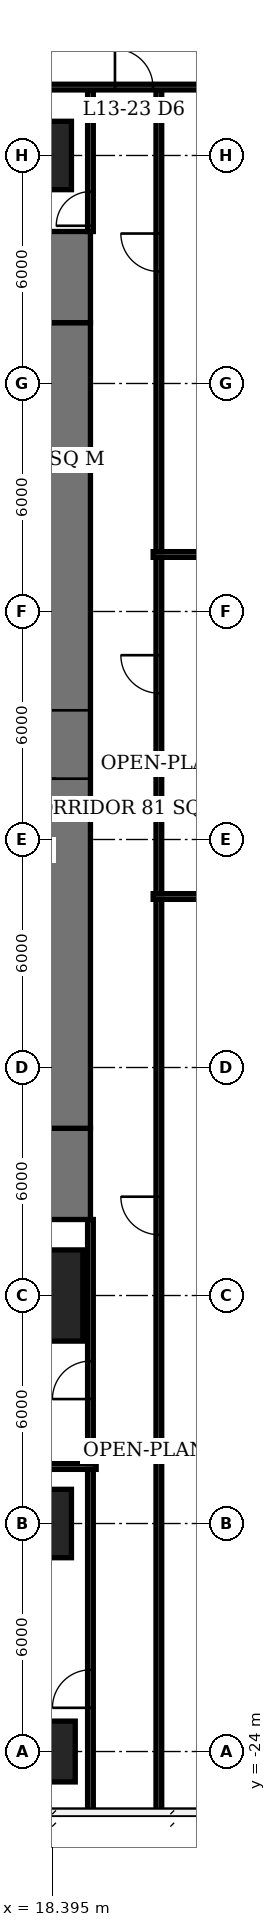
"""IFC4 building model, lengths in metres.
Left out: names, types, materials, properties, quantities, classifications, styles, units other than length and angle.
Written with IfcOpenShell. Run it as: python <this file> out.ifc"""

import sys

from ifc_helpers import new_model, si_unit, direction, frame, frame_2d, origin, origin_2d, place, context, subcontext, project, spatial, rectangle, extrude, element, fill, save


model = new_model("IFC4")
c1 = context("Model", 3, precision=1e-05, world=origin(), true_north=direction((0.0, 1.0)))
c2 = subcontext(c1, "Body", "Model", "MODEL_VIEW")
j1 = project(units=[si_unit("LENGTHUNIT", "METRE"), si_unit("PLANEANGLEUNIT", "RADIAN")], contexts=[c1])
p1 = place(None, origin())
s1 = spatial("IfcSite", under=j1, at=p1, CompositionType="ELEMENT")
p2 = place(p1, origin())
s2 = spatial("IfcBuilding", under=s1, at=p2, CompositionType="ELEMENT")
p3 = place(p2, frame((0.0, 0.0, 57.2)))
s3 = spatial("IfcBuildingStorey", under=s2, at=p3, CompositionType="ELEMENT", Elevation=57.2)
p4 = place(p3, frame((18.0, -24.0, 0.0), z_axis=(0.0, 0.0, 1.0), x_axis=(1.0, 0.0, 0.0)))
e1 = element("IfcColumn", 1, at=p4, inside=s3, PredefinedType="COLUMN", context=c2, shape_type="SweptSolid", body=[
    extrude(rectangle(XDim=2.0, YDim=1.6, at=origin_2d()), origin(), (0.0, 0.0, 1.0), 3.9),
])
p5 = place(p3, frame((18.0, -18.0, 0.0), z_axis=(0.0, 0.0, 1.0), x_axis=(1.0, 0.0, 0.0)))
e2 = element("IfcColumn", 2, at=p5, inside=s3, PredefinedType="COLUMN", context=c2, shape_type="SweptSolid", body=[
    extrude(rectangle(XDim=1.8, YDim=1.8, at=origin_2d()), origin(), (0.0, 0.0, 1.0), 3.9),
])
p6 = place(p3, frame((18.0, -12.0, 0.0), z_axis=(0.0, 0.0, 1.0), x_axis=(1.0, 0.0, 0.0)))
e3 = element("IfcColumn", 3, at=p6, inside=s3, PredefinedType="COLUMN", context=c2, shape_type="SweptSolid", body=[
    extrude(rectangle(XDim=2.4, YDim=2.4, at=origin_2d()), origin(), (0.0, 0.0, 1.0), 3.9),
])
p7 = place(p3, frame((18.0, 18.0, 0.0), z_axis=(0.0, 0.0, 1.0), x_axis=(1.0, 0.0, 0.0)))
e4 = element("IfcColumn", 4, at=p7, inside=s3, PredefinedType="COLUMN", context=c2, shape_type="SweptSolid", body=[
    extrude(rectangle(XDim=1.8, YDim=1.8, at=origin_2d()), origin(), (0.0, 0.0, 1.0), 3.9),
])
p8 = place(p3, frame((18.5, -7.6, 0.0), z_axis=(0.0, 0.0, 1.0), x_axis=(0.0, 1.0, 0.0)))
e5 = element("IfcWall", 5, at=p8, inside=s3, PredefinedType="SHEAR", context=c2, shape_type="SweptSolid", body=[
    extrude(rectangle(XDim=21.2, YDim=1.8, at=frame_2d((10.6, 0.0))), origin(), (0.0, 0.0, 1.0), 3.9),
])
p9 = place(p8, frame((9.2, 0.0, 0.0)))
e6 = element("IfcOpeningElement", 6, at=p9, cuts=e5, PredefinedType="OPENING", context=c2, shape_type="SweptSolid", body=[
    extrude(rectangle(XDim=1.8, YDim=2.4, at=frame_2d((0.9, 1.2))), frame((0.0, 0.91, 0.0), z_axis=(0.0, -1.0, 0.0), x_axis=(1.0, 0.0, 0.0)), (0.0, 0.0, 1.0), 1.82),
])
for number, where, z_axis, x_axis in (
    (7, (18.5, -10.0, 0.0), (0.0, 0.0, 1.0), (0.0, 1.0, 0.0)),
    (8, (18.5, 13.6, 0.0), (0.0, 0.0, 1.0), (0.0, 1.0, 0.0)),
):
    element("IfcWall", number, at=place(p3, frame(where, z_axis=z_axis, x_axis=x_axis)), inside=s3, PredefinedType="SHEAR", context=c2, shape_type="SweptSolid", body=[
        extrude(rectangle(XDim=2.4, YDim=1.8, at=frame_2d((1.2, 0.0))), origin(), (0.0, 0.0, 1.0), 3.9),
    ])
p10 = place(p3, frame((18.075, 19.8, 0.0), z_axis=(0.0, 0.0, 1.0), x_axis=(1.0, 0.0, 0.0)))
e9 = element("IfcWall", 9, at=p10, inside=s3, PredefinedType="PARTITIONING", context=c2, shape_type="SweptSolid", body=[
    extrude(rectangle(XDim=5.015, YDim=0.15, at=frame_2d((2.508, 0.0))), origin(), (0.0, 0.0, 1.0), 3.65),
])
p11 = place(p10, frame((1.97, 0.0, 0.0)))
e10 = element("IfcOpeningElement", 10, at=p11, cuts=e9, PredefinedType="OPENING", context=c2, shape_type="SweptSolid", body=[
    extrude(rectangle(XDim=1.0, YDim=2.1, at=frame_2d((0.5, 1.05))), frame((0.0, 0.085, 0.0), z_axis=(0.0, -1.0, 0.0), x_axis=(1.0, 0.0, 0.0)), (0.0, 0.0, 1.0), 0.17),
])
p12 = place(p3, frame((4.575, -16.5, 0.0), z_axis=(0.0, 0.0, 1.0), x_axis=(1.0, 0.0, 0.0)))
e11 = element("IfcWall", 11, at=p12, inside=s3, PredefinedType="PARTITIONING", context=c2, shape_type="SweptSolid", body=[
    extrude(rectangle(XDim=14.975, YDim=0.15, at=frame_2d((7.488, 0.0))), origin(), (0.0, 0.0, 1.0), 3.65),
])
p13 = place(p3, frame((19.4, -25.6, 0.0), z_axis=(0.0, 0.0, 1.0), x_axis=(0.0, 1.0, 0.0)))
e12 = element("IfcWall", 12, at=p13, inside=s3, PredefinedType="PARTITIONING", context=c2, shape_type="SweptSolid", body=[
    extrude(rectangle(XDim=9.025, YDim=0.15, at=frame_2d((4.513, 0.0))), origin(), (0.0, 0.0, 1.0), 3.65),
])
p14 = place(p13, frame((2.75, 0.0, 0.0)))
e13 = element("IfcOpeningElement", 13, at=p14, cuts=e12, PredefinedType="OPENING", context=c2, shape_type="SweptSolid", body=[
    extrude(rectangle(XDim=1.0, YDim=2.1, at=frame_2d((0.5, 1.05))), frame((0.0, 0.085, 0.0), z_axis=(0.0, -1.0, 0.0), x_axis=(1.0, 0.0, 0.0)), (0.0, 0.0, 1.0), 0.17),
])
p15 = place(p3, frame((19.4, -16.425, 0.0), z_axis=(0.0, 0.0, 1.0), x_axis=(0.0, 1.0, 0.0)))
e14 = element("IfcWall", 14, at=p15, inside=s3, PredefinedType="PARTITIONING", context=c2, shape_type="SweptSolid", body=[
    extrude(rectangle(XDim=6.425, YDim=0.15, at=frame_2d((3.212, 0.0))), origin(), (0.0, 0.0, 1.0), 3.65),
])
p16 = place(p15, frame((1.7, 0.0, 0.0)))
e15 = element("IfcOpeningElement", 15, at=p16, cuts=e14, PredefinedType="OPENING", context=c2, shape_type="SweptSolid", body=[
    extrude(rectangle(XDim=1.0, YDim=2.1, at=frame_2d((0.5, 1.05))), frame((0.0, 0.085, 0.0), z_axis=(0.0, -1.0, 0.0), x_axis=(1.0, 0.0, 0.0)), (0.0, 0.0, 1.0), 0.17),
])
p17 = place(p3, frame((19.4, 16.0, 0.0), z_axis=(0.0, 0.0, 1.0), x_axis=(0.0, 1.0, 0.0)))
e16 = element("IfcWall", 16, at=p17, inside=s3, PredefinedType="PARTITIONING", context=c2, shape_type="SweptSolid", body=[
    extrude(rectangle(XDim=3.725, YDim=0.15, at=frame_2d((1.863, 0.0))), origin(), (0.0, 0.0, 1.0), 3.65),
])
p18 = place(p17, frame((0.15, 0.0, 0.0)))
e17 = element("IfcOpeningElement", 17, at=p18, cuts=e16, PredefinedType="OPENING", context=c2, shape_type="SweptSolid", body=[
    extrude(rectangle(XDim=0.9, YDim=2.1, at=frame_2d((0.45, 1.05))), frame((0.0, 0.085, 0.0), z_axis=(0.0, -1.0, 0.0), x_axis=(1.0, 0.0, 0.0)), (0.0, 0.0, 1.0), 0.17),
])
p19 = place(p3, frame((21.2, -25.6, 0.0), z_axis=(0.0, 0.0, 1.0), x_axis=(0.0, 1.0, 0.0)))
e18 = element("IfcWall", 18, at=p19, inside=s3, PredefinedType="PARTITIONING", context=c2, shape_type="SweptSolid", body=[
    extrude(rectangle(XDim=24.025, YDim=0.15, at=frame_2d((12.013, 0.0))), origin(), (0.0, 0.0, 1.0), 3.65),
])
p20 = place(p19, frame((15.2, 0.0, 0.0)))
e19 = element("IfcOpeningElement", 19, at=p20, cuts=e18, PredefinedType="OPENING", context=c2, shape_type="SweptSolid", body=[
    extrude(rectangle(XDim=1.0, YDim=2.1, at=frame_2d((0.5, 1.05))), frame((0.0, 0.085, 0.0), z_axis=(0.0, -1.0, 0.0), x_axis=(1.0, 0.0, 0.0)), (0.0, 0.0, 1.0), 0.17),
])
p21 = place(p3, frame((21.2, -1.425, 0.0), z_axis=(0.0, 0.0, 1.0), x_axis=(0.0, 1.0, 0.0)))
e20 = element("IfcWall", 20, at=p21, inside=s3, PredefinedType="PARTITIONING", context=c2, shape_type="SweptSolid", body=[
    extrude(rectangle(XDim=8.85, YDim=0.15, at=frame_2d((4.425, 0.0))), origin(), (0.0, 0.0, 1.0), 3.65),
])
p22 = place(p21, frame((5.275, 0.0, 0.0)))
e21 = element("IfcOpeningElement", 21, at=p22, cuts=e20, PredefinedType="OPENING", context=c2, shape_type="SweptSolid", body=[
    extrude(rectangle(XDim=1.0, YDim=2.1, at=frame_2d((0.5, 1.05))), frame((0.0, 0.085, 0.0), z_axis=(0.0, -1.0, 0.0), x_axis=(1.0, 0.0, 0.0)), (0.0, 0.0, 1.0), 0.17),
])
p23 = place(p3, frame((21.05, -1.5, 0.0), z_axis=(0.0, 0.0, 1.0), x_axis=(1.0, 0.0, 0.0)))
e22 = element("IfcWall", 22, at=p23, inside=s3, PredefinedType="PARTITIONING", context=c2, shape_type="SweptSolid", body=[
    extrude(rectangle(XDim=2.875, YDim=0.15, at=frame_2d((1.438, 0.0))), origin(), (0.0, 0.0, 1.0), 3.65),
])
p24 = place(p3, frame((21.2, 7.575, 0.0), z_axis=(0.0, 0.0, 1.0), x_axis=(0.0, 1.0, 0.0)))
e23 = element("IfcWall", 23, at=p24, inside=s3, PredefinedType="PARTITIONING", context=c2, shape_type="SweptSolid", body=[
    extrude(rectangle(XDim=12.15, YDim=0.15, at=frame_2d((6.075, 0.0))), origin(), (0.0, 0.0, 1.0), 3.65),
])
p25 = place(p24, frame((7.371, 0.0, 0.0)))
e24 = element("IfcOpeningElement", 24, at=p25, cuts=e23, PredefinedType="OPENING", context=c2, shape_type="SweptSolid", body=[
    extrude(rectangle(XDim=1.0, YDim=2.1, at=frame_2d((0.5, 1.05))), frame((0.0, 0.085, 0.0), z_axis=(0.0, -1.0, 0.0), x_axis=(1.0, 0.0, 0.0)), (0.0, 0.0, 1.0), 0.17),
])
p26 = place(p3, frame((21.05, 7.5, 0.0), z_axis=(0.0, 0.0, 1.0), x_axis=(1.0, 0.0, 0.0)))
e25 = element("IfcWall", 25, at=p26, inside=s3, PredefinedType="PARTITIONING", context=c2, shape_type="SweptSolid", body=[
    extrude(rectangle(XDim=6.54, YDim=0.15, at=frame_2d((3.27, 0.0))), origin(), (0.0, 0.0, 1.0), 3.65),
])
p27 = place(p9, origin())
e26 = element("IfcDoor", 26, at=p27, inside=s3, OperationType="DOUBLE_DOOR_SINGLE_SWING", PredefinedType="DOOR", context=c2, shape_type="SweptSolid", body=[
    extrude(rectangle(XDim=1.8, YDim=2.4, at=frame_2d((0.9, 1.2))), frame((0.0, 0.025, 0.0), z_axis=(0.0, -1.0, 0.0), x_axis=(1.0, 0.0, 0.0)), (0.0, 0.0, 1.0), 0.05),
])
fill(e6, e26)
p28 = place(p11, origin())
e27 = element("IfcDoor", 27, at=p28, inside=s3, OperationType="SINGLE_SWING_LEFT", PredefinedType="DOOR", context=c2, shape_type="SweptSolid", body=[
    extrude(rectangle(XDim=1.0, YDim=2.1, at=frame_2d((0.5, 1.05))), frame((0.0, 0.025, 0.0), z_axis=(0.0, -1.0, 0.0), x_axis=(1.0, 0.0, 0.0)), (0.0, 0.0, 1.0), 0.05),
])
fill(e10, e27)
p29 = place(p14, origin())
e28 = element("IfcDoor", 28, at=p29, inside=s3, OperationType="SINGLE_SWING_LEFT", PredefinedType="DOOR", context=c2, shape_type="SweptSolid", body=[
    extrude(rectangle(XDim=1.0, YDim=2.1, at=frame_2d((0.5, 1.05))), frame((0.0, 0.025, 0.0), z_axis=(0.0, -1.0, 0.0), x_axis=(1.0, 0.0, 0.0)), (0.0, 0.0, 1.0), 0.05),
])
fill(e13, e28)
p30 = place(p20, origin())
e29 = element("IfcDoor", 29, at=p30, inside=s3, OperationType="SINGLE_SWING_RIGHT", PredefinedType="DOOR", context=c2, shape_type="SweptSolid", body=[
    extrude(rectangle(XDim=1.0, YDim=2.1, at=frame_2d((0.5, 1.05))), frame((0.0, 0.025, 0.0), z_axis=(0.0, -1.0, 0.0), x_axis=(1.0, 0.0, 0.0)), (0.0, 0.0, 1.0), 0.05),
])
fill(e19, e29)
p31 = place(p16, origin())
e30 = element("IfcDoor", 30, at=p31, inside=s3, OperationType="SINGLE_SWING_LEFT", PredefinedType="DOOR", context=c2, shape_type="SweptSolid", body=[
    extrude(rectangle(XDim=1.0, YDim=2.1, at=frame_2d((0.5, 1.05))), frame((0.0, 0.025, 0.0), z_axis=(0.0, -1.0, 0.0), x_axis=(1.0, 0.0, 0.0)), (0.0, 0.0, 1.0), 0.05),
])
fill(e15, e30)
p32 = place(p22, origin())
e31 = element("IfcDoor", 31, at=p32, inside=s3, OperationType="SINGLE_SWING_RIGHT", PredefinedType="DOOR", context=c2, shape_type="SweptSolid", body=[
    extrude(rectangle(XDim=1.0, YDim=2.1, at=frame_2d((0.5, 1.05))), frame((0.0, 0.025, 0.0), z_axis=(0.0, -1.0, 0.0), x_axis=(1.0, 0.0, 0.0)), (0.0, 0.0, 1.0), 0.05),
])
fill(e21, e31)
p33 = place(p25, origin())
e32 = element("IfcDoor", 32, at=p33, inside=s3, OperationType="SINGLE_SWING_RIGHT", PredefinedType="DOOR", context=c2, shape_type="SweptSolid", body=[
    extrude(rectangle(XDim=1.0, YDim=2.1, at=frame_2d((0.5, 1.05))), frame((0.0, 0.025, 0.0), z_axis=(0.0, -1.0, 0.0), x_axis=(1.0, 0.0, 0.0)), (0.0, 0.0, 1.0), 0.05),
])
fill(e24, e32)
p34 = place(p18, origin())
e33 = element("IfcDoor", 33, at=p34, inside=s3, OperationType="SINGLE_SWING_LEFT", PredefinedType="DOOR", context=c2, shape_type="SweptSolid", body=[
    extrude(rectangle(XDim=0.9, YDim=2.1, at=frame_2d((0.45, 1.05))), frame((0.0, 0.025, 0.0), z_axis=(0.0, -1.0, 0.0), x_axis=(1.0, 0.0, 0.0)), (0.0, 0.0, 1.0), 0.05),
])
fill(e17, e33)
save(model, sys.argv[1])
